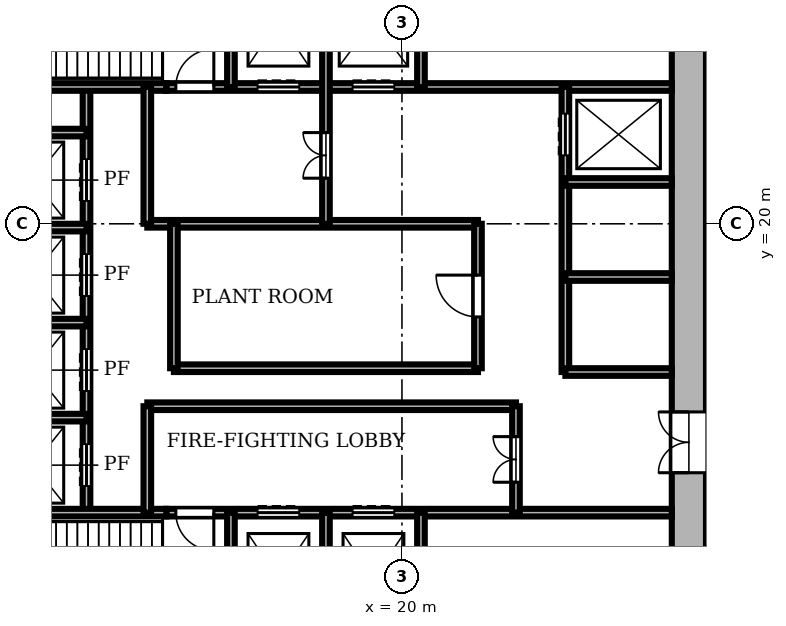
"""IFC4 building model, lengths in metres.
Left out: names, types, materials, properties, quantities, classifications, styles, units other than length and angle.
Written with IfcOpenShell. Run it as: python <this file> out.ifc"""

import sys

from ifc_helpers import new_model, si_unit, direction, frame, frame_2d, origin, place, context, subcontext, project, spatial, rectangle, extrude, element, fill, save


model = new_model("IFC4")
c1 = context("Model", 3, precision=1e-05, world=origin(), true_north=direction((0.0, 1.0)))
c2 = subcontext(c1, "Body", "Model", "MODEL_VIEW")
j1 = project(units=[si_unit("LENGTHUNIT", "METRE"), si_unit("PLANEANGLEUNIT", "RADIAN")], contexts=[c1])
p1 = place(None, origin())
s1 = spatial("IfcSite", under=j1, at=p1, CompositionType="ELEMENT")
p2 = place(p1, origin())
s2 = spatial("IfcBuilding", under=s1, at=p2, CompositionType="ELEMENT")
p3 = place(p2, frame((0.0, 0.0, 117.3)))
s3 = spatial("IfcBuildingStorey", under=s2, at=p3, CompositionType="ELEMENT", Elevation=117.3)
p4 = place(p3, frame((27.55, 8.9, 0.0), z_axis=(0.0, 0.0, 1.0), x_axis=(0.0, 1.0, 0.0)))
e1 = element("IfcWall", 1, at=p4, inside=s3, PredefinedType="SHEAR", context=c2, shape_type="SweptSolid", body=[
    extrude(rectangle(XDim=18.2, YDim=0.9, at=frame_2d((9.1, 0.0))), origin(), (0.0, 0.0, 1.0), 9.0),
])
p5 = place(p4, frame((4.55, 0.0, 0.0)))
e2 = element("IfcOpeningElement", 2, at=p5, cuts=e1, PredefinedType="OPENING", context=c2, shape_type="SweptSolid", body=[
    extrude(rectangle(XDim=1.6, YDim=2.1, at=frame_2d((0.8, 1.05))), frame((0.0, 0.46, 0.0), z_axis=(0.0, -1.0, 0.0), x_axis=(1.0, 0.0, 0.0)), (0.0, 0.0, 1.0), 0.92),
])
p6 = place(p3, frame((8.9, 12.4, 0.0), z_axis=(0.0, 0.0, 1.0), x_axis=(1.0, 0.0, 0.0)))
e3 = element("IfcWall", 3, at=p6, inside=s3, PredefinedType="SHEAR", context=c2, shape_type="SweptSolid", body=[
    extrude(rectangle(XDim=4.9, YDim=0.2, at=frame_2d((2.45, 0.0))), origin(), (0.0, 0.0, 1.0), 8.55),
])
p7 = place(p3, frame((13.8, 12.4, 0.0), z_axis=(0.0, 0.0, 1.0), x_axis=(1.0, 0.0, 0.0)))
e4 = element("IfcWall", 4, at=p7, inside=s3, PredefinedType="SHEAR", context=c2, shape_type="SweptSolid", body=[
    extrude(rectangle(XDim=13.3, YDim=0.2, at=frame_2d((6.65, 0.0))), origin(), (0.0, 0.0, 1.0), 8.55),
])
p8 = place(p7, frame((2.4, 0.0, 0.0)))
e5 = element("IfcOpeningElement", 5, at=p8, cuts=e4, PredefinedType="OPENING", context=c2, shape_type="SweptSolid", body=[
    extrude(rectangle(XDim=1.1, YDim=2.1, at=frame_2d((0.55, 1.05))), frame((0.0, 0.11, 0.0), z_axis=(0.0, -1.0, 0.0), x_axis=(1.0, 0.0, 0.0)), (0.0, 0.0, 1.0), 0.22),
])
p9 = place(p7, frame((4.9, 0.0, 0.0)))
e6 = element("IfcOpeningElement", 6, at=p9, cuts=e4, PredefinedType="OPENING", context=c2, shape_type="SweptSolid", body=[
    extrude(rectangle(XDim=1.1, YDim=2.1, at=frame_2d((0.55, 1.05))), frame((0.0, 0.11, 0.0), z_axis=(0.0, -1.0, 0.0), x_axis=(1.0, 0.0, 0.0)), (0.0, 0.0, 1.0), 0.22),
])
p10 = place(p7, frame((0.25, 0.0, 0.0)))
e7 = element("IfcOpeningElement", 7, at=p10, cuts=e4, PredefinedType="OPENING", context=c2, shape_type="SweptSolid", body=[
    extrude(rectangle(XDim=1.0, YDim=2.1, at=frame_2d((0.5, 1.05))), frame((0.0, 0.11, 0.0), z_axis=(0.0, -1.0, 0.0), x_axis=(1.0, 0.0, 0.0)), (0.0, 0.0, 1.0), 0.22),
])
p11 = place(p3, frame((8.9, 14.9, 0.0), z_axis=(0.0, 0.0, 1.0), x_axis=(1.0, 0.0, 0.0)))
e8 = element("IfcWall", 8, at=p11, inside=s3, PredefinedType="SHEAR", context=c2, shape_type="SweptSolid", body=[
    extrude(rectangle(XDim=2.8, YDim=0.2, at=frame_2d((1.4, 0.0))), origin(), (0.0, 0.0, 1.0), 8.55),
])
p12 = place(p3, frame((13.3, 15.2, 0.0), z_axis=(0.0, 0.0, 1.0), x_axis=(1.0, 0.0, 0.0)))
e9 = element("IfcWall", 9, at=p12, inside=s3, PredefinedType="SHEAR", context=c2, shape_type="SweptSolid", body=[
    extrude(rectangle(XDim=9.7, YDim=0.2, at=frame_2d((4.85, 0.0))), origin(), (0.0, 0.0, 1.0), 8.55),
])
p13 = place(p3, frame((24.3, 16.1, 0.0), z_axis=(0.0, 0.0, 1.0), x_axis=(1.0, 0.0, 0.0)))
e10 = element("IfcWall", 10, at=p13, inside=s3, PredefinedType="SHEAR", context=c2, shape_type="SweptSolid", body=[
    extrude(rectangle(XDim=2.8, YDim=0.2, at=frame_2d((1.4, 0.0))), origin(), (0.0, 0.0, 1.0), 8.55),
])
p14 = place(p3, frame((14.0, 16.2, 0.0), z_axis=(0.0, 0.0, 1.0), x_axis=(1.0, 0.0, 0.0)))
e11 = element("IfcWall", 11, at=p14, inside=s3, PredefinedType="SHEAR", context=c2, shape_type="SweptSolid", body=[
    extrude(rectangle(XDim=8.0, YDim=0.2, at=frame_2d((4.0, 0.0))), origin(), (0.0, 0.0, 1.0), 8.55),
])
for number, where, z_axis, x_axis in (
    (12, (8.9, 17.4, 0.0), (0.0, 0.0, 1.0), (1.0, 0.0, 0.0)),
    (13, (24.3, 18.6, 0.0), (0.0, 0.0, 1.0), (1.0, 0.0, 0.0)),
    (14, (8.9, 19.9, 0.0), (0.0, 0.0, 1.0), (1.0, 0.0, 0.0)),
):
    element("IfcWall", number, at=place(p3, frame(where, z_axis=z_axis, x_axis=x_axis)), inside=s3, PredefinedType="SHEAR", context=c2, shape_type="SweptSolid", body=[
        extrude(rectangle(XDim=2.8, YDim=0.2, at=frame_2d((1.4, 0.0))), origin(), (0.0, 0.0, 1.0), 8.55),
    ])
p15 = place(p3, frame((13.3, 20.0, 0.0), z_axis=(0.0, 0.0, 1.0), x_axis=(1.0, 0.0, 0.0)))
e15 = element("IfcWall", 15, at=p15, inside=s3, PredefinedType="SHEAR", context=c2, shape_type="SweptSolid", body=[
    extrude(rectangle(XDim=8.7, YDim=0.2, at=frame_2d((4.35, 0.0))), origin(), (0.0, 0.0, 1.0), 8.55),
])
for number, where, z_axis, x_axis in (
    (16, (24.3, 21.1, 0.0), (0.0, 0.0, 1.0), (1.0, 0.0, 0.0)),
    (17, (8.9, 22.4, 0.0), (0.0, 0.0, 1.0), (1.0, 0.0, 0.0)),
):
    element("IfcWall", number, at=place(p3, frame(where, z_axis=z_axis, x_axis=x_axis)), inside=s3, PredefinedType="SHEAR", context=c2, shape_type="SweptSolid", body=[
        extrude(rectangle(XDim=2.8, YDim=0.2, at=frame_2d((1.4, 0.0))), origin(), (0.0, 0.0, 1.0), 8.55),
    ])
p16 = place(p3, frame((8.9, 23.6, 0.0), z_axis=(0.0, 0.0, 1.0), x_axis=(1.0, 0.0, 0.0)))
e18 = element("IfcWall", 18, at=p16, inside=s3, PredefinedType="SHEAR", context=c2, shape_type="SweptSolid", body=[
    extrude(rectangle(XDim=4.9, YDim=0.2, at=frame_2d((2.45, 0.0))), origin(), (0.0, 0.0, 1.0), 8.55),
])
p17 = place(p3, frame((13.8, 23.6, 0.0), z_axis=(0.0, 0.0, 1.0), x_axis=(1.0, 0.0, 0.0)))
e19 = element("IfcWall", 19, at=p17, inside=s3, PredefinedType="SHEAR", context=c2, shape_type="SweptSolid", body=[
    extrude(rectangle(XDim=13.3, YDim=0.2, at=frame_2d((6.65, 0.0))), origin(), (0.0, 0.0, 1.0), 8.55),
])
p18 = place(p17, frame((2.4, 0.0, 0.0)))
e20 = element("IfcOpeningElement", 20, at=p18, cuts=e19, PredefinedType="OPENING", context=c2, shape_type="SweptSolid", body=[
    extrude(rectangle(XDim=1.1, YDim=2.1, at=frame_2d((0.55, 1.05))), frame((0.0, 0.11, 0.0), z_axis=(0.0, -1.0, 0.0), x_axis=(1.0, 0.0, 0.0)), (0.0, 0.0, 1.0), 0.22),
])
p19 = place(p17, frame((4.9, 0.0, 0.0)))
e21 = element("IfcOpeningElement", 21, at=p19, cuts=e19, PredefinedType="OPENING", context=c2, shape_type="SweptSolid", body=[
    extrude(rectangle(XDim=1.1, YDim=2.1, at=frame_2d((0.55, 1.05))), frame((0.0, 0.11, 0.0), z_axis=(0.0, -1.0, 0.0), x_axis=(1.0, 0.0, 0.0)), (0.0, 0.0, 1.0), 0.22),
])
p20 = place(p17, frame((0.25, 0.0, 0.0)))
e22 = element("IfcOpeningElement", 22, at=p20, cuts=e19, PredefinedType="OPENING", context=c2, shape_type="SweptSolid", body=[
    extrude(rectangle(XDim=1.0, YDim=2.1, at=frame_2d((0.5, 1.05))), frame((0.0, 0.11, 0.0), z_axis=(0.0, -1.0, 0.0), x_axis=(1.0, 0.0, 0.0)), (0.0, 0.0, 1.0), 0.22),
])
p21 = place(p3, frame((11.7, 12.4, 0.0), z_axis=(0.0, 0.0, 1.0), x_axis=(0.0, 1.0, 0.0)))
e23 = element("IfcWall", 23, at=p21, inside=s3, PredefinedType="SHEAR", context=c2, shape_type="SweptSolid", body=[
    extrude(rectangle(XDim=11.2, YDim=0.2, at=frame_2d((5.6, 0.0))), origin(), (0.0, 0.0, 1.0), 8.55),
])
p22 = place(p21, frame((0.7, 0.0, 0.0)))
e24 = element("IfcOpeningElement", 24, at=p22, cuts=e23, PredefinedType="OPENING", context=c2, shape_type="SweptSolid", body=[
    extrude(rectangle(XDim=1.1, YDim=2.1, at=frame_2d((0.55, 1.05))), frame((0.0, 0.11, 0.0), z_axis=(0.0, -1.0, 0.0), x_axis=(1.0, 0.0, 0.0)), (0.0, 0.0, 1.0), 0.22),
])
p23 = place(p21, frame((3.2, 0.0, 0.0)))
e25 = element("IfcOpeningElement", 25, at=p23, cuts=e23, PredefinedType="OPENING", context=c2, shape_type="SweptSolid", body=[
    extrude(rectangle(XDim=1.1, YDim=2.1, at=frame_2d((0.55, 1.05))), frame((0.0, 0.11, 0.0), z_axis=(0.0, -1.0, 0.0), x_axis=(1.0, 0.0, 0.0)), (0.0, 0.0, 1.0), 0.22),
])
p24 = place(p21, frame((5.7, 0.0, 0.0)))
e26 = element("IfcOpeningElement", 26, at=p24, cuts=e23, PredefinedType="OPENING", context=c2, shape_type="SweptSolid", body=[
    extrude(rectangle(XDim=1.1, YDim=2.1, at=frame_2d((0.55, 1.05))), frame((0.0, 0.11, 0.0), z_axis=(0.0, -1.0, 0.0), x_axis=(1.0, 0.0, 0.0)), (0.0, 0.0, 1.0), 0.22),
])
p25 = place(p21, frame((8.2, 0.0, 0.0)))
e27 = element("IfcOpeningElement", 27, at=p25, cuts=e23, PredefinedType="OPENING", context=c2, shape_type="SweptSolid", body=[
    extrude(rectangle(XDim=1.1, YDim=2.1, at=frame_2d((0.55, 1.05))), frame((0.0, 0.11, 0.0), z_axis=(0.0, -1.0, 0.0), x_axis=(1.0, 0.0, 0.0)), (0.0, 0.0, 1.0), 0.22),
])
p26 = place(p3, frame((13.3, 12.4, 0.0), z_axis=(0.0, 0.0, 1.0), x_axis=(0.0, 1.0, 0.0)))
e28 = element("IfcWall", 28, at=p26, inside=s3, PredefinedType="SHEAR", context=c2, shape_type="SweptSolid", body=[
    extrude(rectangle(XDim=2.8, YDim=0.2, at=frame_2d((1.4, 0.0))), origin(), (0.0, 0.0, 1.0), 8.55),
])
p27 = place(p3, frame((13.3, 20.0, 0.0), z_axis=(0.0, 0.0, 1.0), x_axis=(0.0, 1.0, 0.0)))
e29 = element("IfcWall", 29, at=p27, inside=s3, PredefinedType="SHEAR", context=c2, shape_type="SweptSolid", body=[
    extrude(rectangle(XDim=3.6, YDim=0.2, at=frame_2d((1.8, 0.0))), origin(), (0.0, 0.0, 1.0), 8.55),
])
p28 = place(p3, frame((14.0, 16.2, 0.0), z_axis=(0.0, 0.0, 1.0), x_axis=(0.0, 1.0, 0.0)))
e30 = element("IfcWall", 30, at=p28, inside=s3, PredefinedType="SHEAR", context=c2, shape_type="SweptSolid", body=[
    extrude(rectangle(XDim=3.8, YDim=0.2, at=frame_2d((1.9, 0.0))), origin(), (0.0, 0.0, 1.0), 8.55),
])
for number, where, z_axis, x_axis in (
    (31, (15.5, 8.9, 0.0), (0.0, 0.0, 1.0), (0.0, 1.0, 0.0)),
    (32, (15.5, 23.6, 0.0), (0.0, 0.0, 1.0), (0.0, 1.0, 0.0)),
    (33, (18.0, 8.9, 0.0), (0.0, 0.0, 1.0), (0.0, 1.0, 0.0)),
):
    element("IfcWall", number, at=place(p3, frame(where, z_axis=z_axis, x_axis=x_axis)), inside=s3, PredefinedType="SHEAR", context=c2, shape_type="SweptSolid", body=[
        extrude(rectangle(XDim=3.5, YDim=0.2, at=frame_2d((1.75, 0.0))), origin(), (0.0, 0.0, 1.0), 8.55),
    ])
p29 = place(p3, frame((18.0, 20.0, 0.0), z_axis=(0.0, 0.0, 1.0), x_axis=(0.0, 1.0, 0.0)))
e34 = element("IfcWall", 34, at=p29, inside=s3, PredefinedType="SHEAR", context=c2, shape_type="SweptSolid", body=[
    extrude(rectangle(XDim=7.1, YDim=0.2, at=frame_2d((3.55, 0.0))), origin(), (0.0, 0.0, 1.0), 8.55),
])
p30 = place(p29, frame((1.2, 0.0, 0.0)))
e35 = element("IfcOpeningElement", 35, at=p30, cuts=e34, PredefinedType="OPENING", context=c2, shape_type="SweptSolid", body=[
    extrude(rectangle(XDim=1.2, YDim=2.1, at=frame_2d((0.6, 1.05))), frame((0.0, 0.11, 0.0), z_axis=(0.0, -1.0, 0.0), x_axis=(1.0, 0.0, 0.0)), (0.0, 0.0, 1.0), 0.22),
])
for number, where, z_axis, x_axis in (
    (36, (20.5, 8.9, 0.0), (0.0, 0.0, 1.0), (0.0, 1.0, 0.0)),
    (37, (20.5, 23.6, 0.0), (0.0, 0.0, 1.0), (0.0, 1.0, 0.0)),
):
    element("IfcWall", number, at=place(p3, frame(where, z_axis=z_axis, x_axis=x_axis)), inside=s3, PredefinedType="SHEAR", context=c2, shape_type="SweptSolid", body=[
        extrude(rectangle(XDim=3.5, YDim=0.2, at=frame_2d((1.75, 0.0))), origin(), (0.0, 0.0, 1.0), 8.55),
    ])
p31 = place(p3, frame((22.0, 16.2, 0.0), z_axis=(0.0, 0.0, 1.0), x_axis=(0.0, 1.0, 0.0)))
e38 = element("IfcWall", 38, at=p31, inside=s3, PredefinedType="SHEAR", context=c2, shape_type="SweptSolid", body=[
    extrude(rectangle(XDim=3.8, YDim=0.2, at=frame_2d((1.9, 0.0))), origin(), (0.0, 0.0, 1.0), 8.55),
])
p32 = place(p31, frame((1.35, 0.0, 0.0)))
e39 = element("IfcOpeningElement", 39, at=p32, cuts=e38, PredefinedType="OPENING", context=c2, shape_type="SweptSolid", body=[
    extrude(rectangle(XDim=1.1, YDim=2.1, at=frame_2d((0.55, 1.05))), frame((0.0, 0.11, 0.0), z_axis=(0.0, -1.0, 0.0), x_axis=(1.0, 0.0, 0.0)), (0.0, 0.0, 1.0), 0.22),
])
p33 = place(p3, frame((23.0, 12.4, 0.0), z_axis=(0.0, 0.0, 1.0), x_axis=(0.0, 1.0, 0.0)))
e40 = element("IfcWall", 40, at=p33, inside=s3, PredefinedType="SHEAR", context=c2, shape_type="SweptSolid", body=[
    extrude(rectangle(XDim=2.8, YDim=0.2, at=frame_2d((1.4, 0.0))), origin(), (0.0, 0.0, 1.0), 8.55),
])
p34 = place(p33, frame((0.8, 0.0, 0.0)))
e41 = element("IfcOpeningElement", 41, at=p34, cuts=e40, PredefinedType="OPENING", context=c2, shape_type="SweptSolid", body=[
    extrude(rectangle(XDim=1.2, YDim=2.1, at=frame_2d((0.6, 1.05))), frame((0.0, 0.11, 0.0), z_axis=(0.0, -1.0, 0.0), x_axis=(1.0, 0.0, 0.0)), (0.0, 0.0, 1.0), 0.22),
])
p35 = place(p3, frame((24.3, 16.1, 0.0), z_axis=(0.0, 0.0, 1.0), x_axis=(0.0, 1.0, 0.0)))
e42 = element("IfcWall", 42, at=p35, inside=s3, PredefinedType="SHEAR", context=c2, shape_type="SweptSolid", body=[
    extrude(rectangle(XDim=7.5, YDim=0.2, at=frame_2d((3.75, 0.0))), origin(), (0.0, 0.0, 1.0), 8.55),
])
p36 = place(p35, frame((5.7, 0.0, 0.0)))
e43 = element("IfcOpeningElement", 43, at=p36, cuts=e42, PredefinedType="OPENING", context=c2, shape_type="SweptSolid", body=[
    extrude(rectangle(XDim=1.1, YDim=2.1, at=frame_2d((0.55, 1.05))), frame((0.0, 0.11, 0.0), z_axis=(0.0, -1.0, 0.0), x_axis=(1.0, 0.0, 0.0)), (0.0, 0.0, 1.0), 0.22),
])
for number, where, z_axis, x_axis in (
    (44, (9.0, 12.6, 7.5), (0.0, 0.0, 1.0), (1.0, 0.0, 0.0)),
    (45, (9.0, 14.7, 7.5), (0.0, 0.0, 1.0), (1.0, 0.0, 0.0)),
):
    element("IfcWall", number, at=place(p3, frame(where, z_axis=z_axis, x_axis=x_axis)), inside=s3, PredefinedType="SOLIDWALL", context=c2, shape_type="SweptSolid", body=[
        extrude(rectangle(XDim=2.6, YDim=0.2, at=frame_2d((1.3, 0.0))), origin(), (0.0, 0.0, 1.0), 1.5),
    ])
p37 = place(p3, frame((11.5, 12.7, 7.5), z_axis=(0.0, 0.0, 1.0), x_axis=(0.0, 1.0, 0.0)))
e46 = element("IfcWall", 46, at=p37, inside=s3, PredefinedType="SOLIDWALL", context=c2, shape_type="SweptSolid", body=[
    extrude(rectangle(XDim=1.9, YDim=0.2, at=frame_2d((0.95, 0.0))), origin(), (0.0, 0.0, 1.0), 1.5),
])
for number, where, z_axis, x_axis in (
    (47, (9.0, 15.1, 7.5), (0.0, 0.0, 1.0), (1.0, 0.0, 0.0)),
    (48, (9.0, 17.2, 7.5), (0.0, 0.0, 1.0), (1.0, 0.0, 0.0)),
):
    element("IfcWall", number, at=place(p3, frame(where, z_axis=z_axis, x_axis=x_axis)), inside=s3, PredefinedType="SOLIDWALL", context=c2, shape_type="SweptSolid", body=[
        extrude(rectangle(XDim=2.6, YDim=0.2, at=frame_2d((1.3, 0.0))), origin(), (0.0, 0.0, 1.0), 1.5),
    ])
p38 = place(p3, frame((11.5, 15.2, 7.5), z_axis=(0.0, 0.0, 1.0), x_axis=(0.0, 1.0, 0.0)))
e49 = element("IfcWall", 49, at=p38, inside=s3, PredefinedType="SOLIDWALL", context=c2, shape_type="SweptSolid", body=[
    extrude(rectangle(XDim=1.9, YDim=0.2, at=frame_2d((0.95, 0.0))), origin(), (0.0, 0.0, 1.0), 1.5),
])
for number, where, z_axis, x_axis in (
    (50, (9.0, 17.6, 7.5), (0.0, 0.0, 1.0), (1.0, 0.0, 0.0)),
    (51, (9.0, 19.7, 7.5), (0.0, 0.0, 1.0), (1.0, 0.0, 0.0)),
):
    element("IfcWall", number, at=place(p3, frame(where, z_axis=z_axis, x_axis=x_axis)), inside=s3, PredefinedType="SOLIDWALL", context=c2, shape_type="SweptSolid", body=[
        extrude(rectangle(XDim=2.6, YDim=0.2, at=frame_2d((1.3, 0.0))), origin(), (0.0, 0.0, 1.0), 1.5),
    ])
p39 = place(p3, frame((11.5, 17.7, 7.5), z_axis=(0.0, 0.0, 1.0), x_axis=(0.0, 1.0, 0.0)))
e52 = element("IfcWall", 52, at=p39, inside=s3, PredefinedType="SOLIDWALL", context=c2, shape_type="SweptSolid", body=[
    extrude(rectangle(XDim=1.9, YDim=0.2, at=frame_2d((0.95, 0.0))), origin(), (0.0, 0.0, 1.0), 1.5),
])
for number, where, z_axis, x_axis in (
    (53, (9.0, 20.1, 7.5), (0.0, 0.0, 1.0), (1.0, 0.0, 0.0)),
    (54, (9.0, 22.2, 7.5), (0.0, 0.0, 1.0), (1.0, 0.0, 0.0)),
):
    element("IfcWall", number, at=place(p3, frame(where, z_axis=z_axis, x_axis=x_axis)), inside=s3, PredefinedType="SOLIDWALL", context=c2, shape_type="SweptSolid", body=[
        extrude(rectangle(XDim=2.6, YDim=0.2, at=frame_2d((1.3, 0.0))), origin(), (0.0, 0.0, 1.0), 1.5),
    ])
p40 = place(p3, frame((11.5, 20.2, 7.5), z_axis=(0.0, 0.0, 1.0), x_axis=(0.0, 1.0, 0.0)))
e55 = element("IfcWall", 55, at=p40, inside=s3, PredefinedType="SOLIDWALL", context=c2, shape_type="SweptSolid", body=[
    extrude(rectangle(XDim=1.9, YDim=0.2, at=frame_2d((0.95, 0.0))), origin(), (0.0, 0.0, 1.0), 1.5),
])
p41 = place(p22, origin())
e56 = element("IfcDoor", 56, at=p41, inside=s3, OperationType="DOUBLE_DOOR_SLIDING", PredefinedType="DOOR", context=c2, shape_type="SweptSolid", body=[
    extrude(rectangle(XDim=1.1, YDim=2.1, at=frame_2d((0.55, 1.05))), frame((0.0, 0.025, 0.0), z_axis=(0.0, -1.0, 0.0), x_axis=(1.0, 0.0, 0.0)), (0.0, 0.0, 1.0), 0.05),
])
fill(e24, e56)
p42 = place(p23, origin())
e57 = element("IfcDoor", 57, at=p42, inside=s3, OperationType="DOUBLE_DOOR_SLIDING", PredefinedType="DOOR", context=c2, shape_type="SweptSolid", body=[
    extrude(rectangle(XDim=1.1, YDim=2.1, at=frame_2d((0.55, 1.05))), frame((0.0, 0.025, 0.0), z_axis=(0.0, -1.0, 0.0), x_axis=(1.0, 0.0, 0.0)), (0.0, 0.0, 1.0), 0.05),
])
fill(e25, e57)
p43 = place(p24, origin())
e58 = element("IfcDoor", 58, at=p43, inside=s3, OperationType="DOUBLE_DOOR_SLIDING", PredefinedType="DOOR", context=c2, shape_type="SweptSolid", body=[
    extrude(rectangle(XDim=1.1, YDim=2.1, at=frame_2d((0.55, 1.05))), frame((0.0, 0.025, 0.0), z_axis=(0.0, -1.0, 0.0), x_axis=(1.0, 0.0, 0.0)), (0.0, 0.0, 1.0), 0.05),
])
fill(e26, e58)
p44 = place(p25, origin())
e59 = element("IfcDoor", 59, at=p44, inside=s3, OperationType="DOUBLE_DOOR_SLIDING", PredefinedType="DOOR", context=c2, shape_type="SweptSolid", body=[
    extrude(rectangle(XDim=1.1, YDim=2.1, at=frame_2d((0.55, 1.05))), frame((0.0, 0.025, 0.0), z_axis=(0.0, -1.0, 0.0), x_axis=(1.0, 0.0, 0.0)), (0.0, 0.0, 1.0), 0.05),
])
fill(e27, e59)
p45 = place(p36, origin())
e60 = element("IfcDoor", 60, at=p45, inside=s3, OperationType="DOUBLE_DOOR_SLIDING", PredefinedType="DOOR", context=c2, shape_type="SweptSolid", body=[
    extrude(rectangle(XDim=1.1, YDim=2.1, at=frame_2d((0.55, 1.05))), frame((0.0, 0.025, 0.0), z_axis=(0.0, -1.0, 0.0), x_axis=(1.0, 0.0, 0.0)), (0.0, 0.0, 1.0), 0.05),
])
fill(e43, e60)
p46 = place(p8, origin())
e61 = element("IfcDoor", 61, at=p46, inside=s3, OperationType="DOUBLE_DOOR_SLIDING", PredefinedType="DOOR", context=c2, shape_type="SweptSolid", body=[
    extrude(rectangle(XDim=1.1, YDim=2.1, at=frame_2d((0.55, 1.05))), frame((0.0, 0.025, 0.0), z_axis=(0.0, -1.0, 0.0), x_axis=(1.0, 0.0, 0.0)), (0.0, 0.0, 1.0), 0.05),
])
fill(e5, e61)
p47 = place(p9, origin())
e62 = element("IfcDoor", 62, at=p47, inside=s3, OperationType="DOUBLE_DOOR_SLIDING", PredefinedType="DOOR", context=c2, shape_type="SweptSolid", body=[
    extrude(rectangle(XDim=1.1, YDim=2.1, at=frame_2d((0.55, 1.05))), frame((0.0, 0.025, 0.0), z_axis=(0.0, -1.0, 0.0), x_axis=(1.0, 0.0, 0.0)), (0.0, 0.0, 1.0), 0.05),
])
fill(e6, e62)
p48 = place(p18, origin())
e63 = element("IfcDoor", 63, at=p48, inside=s3, OperationType="DOUBLE_DOOR_SLIDING", PredefinedType="DOOR", context=c2, shape_type="SweptSolid", body=[
    extrude(rectangle(XDim=1.1, YDim=2.1, at=frame_2d((0.55, 1.05))), frame((0.0, 0.025, 0.0), z_axis=(0.0, -1.0, 0.0), x_axis=(1.0, 0.0, 0.0)), (0.0, 0.0, 1.0), 0.05),
])
fill(e20, e63)
p49 = place(p19, origin())
e64 = element("IfcDoor", 64, at=p49, inside=s3, OperationType="DOUBLE_DOOR_SLIDING", PredefinedType="DOOR", context=c2, shape_type="SweptSolid", body=[
    extrude(rectangle(XDim=1.1, YDim=2.1, at=frame_2d((0.55, 1.05))), frame((0.0, 0.025, 0.0), z_axis=(0.0, -1.0, 0.0), x_axis=(1.0, 0.0, 0.0)), (0.0, 0.0, 1.0), 0.05),
])
fill(e21, e64)
p50 = place(p10, frame((1.0, 0.0, 0.0), z_axis=(0.0, 0.0, 1.0), x_axis=(-1.0, 0.0, 0.0)))
e65 = element("IfcDoor", 65, at=p50, inside=s3, OperationType="SINGLE_SWING_LEFT", PredefinedType="DOOR", context=c2, shape_type="SweptSolid", body=[
    extrude(rectangle(XDim=1.0, YDim=2.1, at=frame_2d((0.5, 1.05))), frame((0.0, 0.025, 0.0), z_axis=(0.0, -1.0, 0.0), x_axis=(1.0, 0.0, 0.0)), (0.0, 0.0, 1.0), 0.05),
])
fill(e7, e65)
p51 = place(p20, origin())
e66 = element("IfcDoor", 66, at=p51, inside=s3, OperationType="SINGLE_SWING_RIGHT", PredefinedType="DOOR", context=c2, shape_type="SweptSolid", body=[
    extrude(rectangle(XDim=1.0, YDim=2.1, at=frame_2d((0.5, 1.05))), frame((0.0, 0.025, 0.0), z_axis=(0.0, -1.0, 0.0), x_axis=(1.0, 0.0, 0.0)), (0.0, 0.0, 1.0), 0.05),
])
fill(e22, e66)
p52 = place(p34, origin())
e67 = element("IfcDoor", 67, at=p52, inside=s3, OperationType="DOUBLE_DOOR_SINGLE_SWING", PredefinedType="DOOR", context=c2, shape_type="SweptSolid", body=[
    extrude(rectangle(XDim=1.2, YDim=2.1, at=frame_2d((0.6, 1.05))), frame((0.0, 0.025, 0.0), z_axis=(0.0, -1.0, 0.0), x_axis=(1.0, 0.0, 0.0)), (0.0, 0.0, 1.0), 0.05),
])
fill(e41, e67)
p53 = place(p30, origin())
e68 = element("IfcDoor", 68, at=p53, inside=s3, OperationType="DOUBLE_DOOR_SINGLE_SWING", PredefinedType="DOOR", context=c2, shape_type="SweptSolid", body=[
    extrude(rectangle(XDim=1.2, YDim=2.1, at=frame_2d((0.6, 1.05))), frame((0.0, 0.025, 0.0), z_axis=(0.0, -1.0, 0.0), x_axis=(1.0, 0.0, 0.0)), (0.0, 0.0, 1.0), 0.05),
])
fill(e35, e68)
p54 = place(p32, origin())
e69 = element("IfcDoor", 69, at=p54, inside=s3, OperationType="SINGLE_SWING_RIGHT", PredefinedType="DOOR", context=c2, shape_type="SweptSolid", body=[
    extrude(rectangle(XDim=1.1, YDim=2.1, at=frame_2d((0.55, 1.05))), frame((0.0, 0.025, 0.0), z_axis=(0.0, -1.0, 0.0), x_axis=(1.0, 0.0, 0.0)), (0.0, 0.0, 1.0), 0.05),
])
fill(e39, e69)
p55 = place(p5, origin())
e70 = element("IfcDoor", 70, at=p55, inside=s3, OperationType="DOUBLE_DOOR_SINGLE_SWING", PredefinedType="DOOR", context=c2, shape_type="SweptSolid", body=[
    extrude(rectangle(XDim=1.6, YDim=2.1, at=frame_2d((0.8, 1.05))), frame((0.0, 0.025, 0.0), z_axis=(0.0, -1.0, 0.0), x_axis=(1.0, 0.0, 0.0)), (0.0, 0.0, 1.0), 0.05),
])
fill(e2, e70)
save(model, sys.argv[1])
